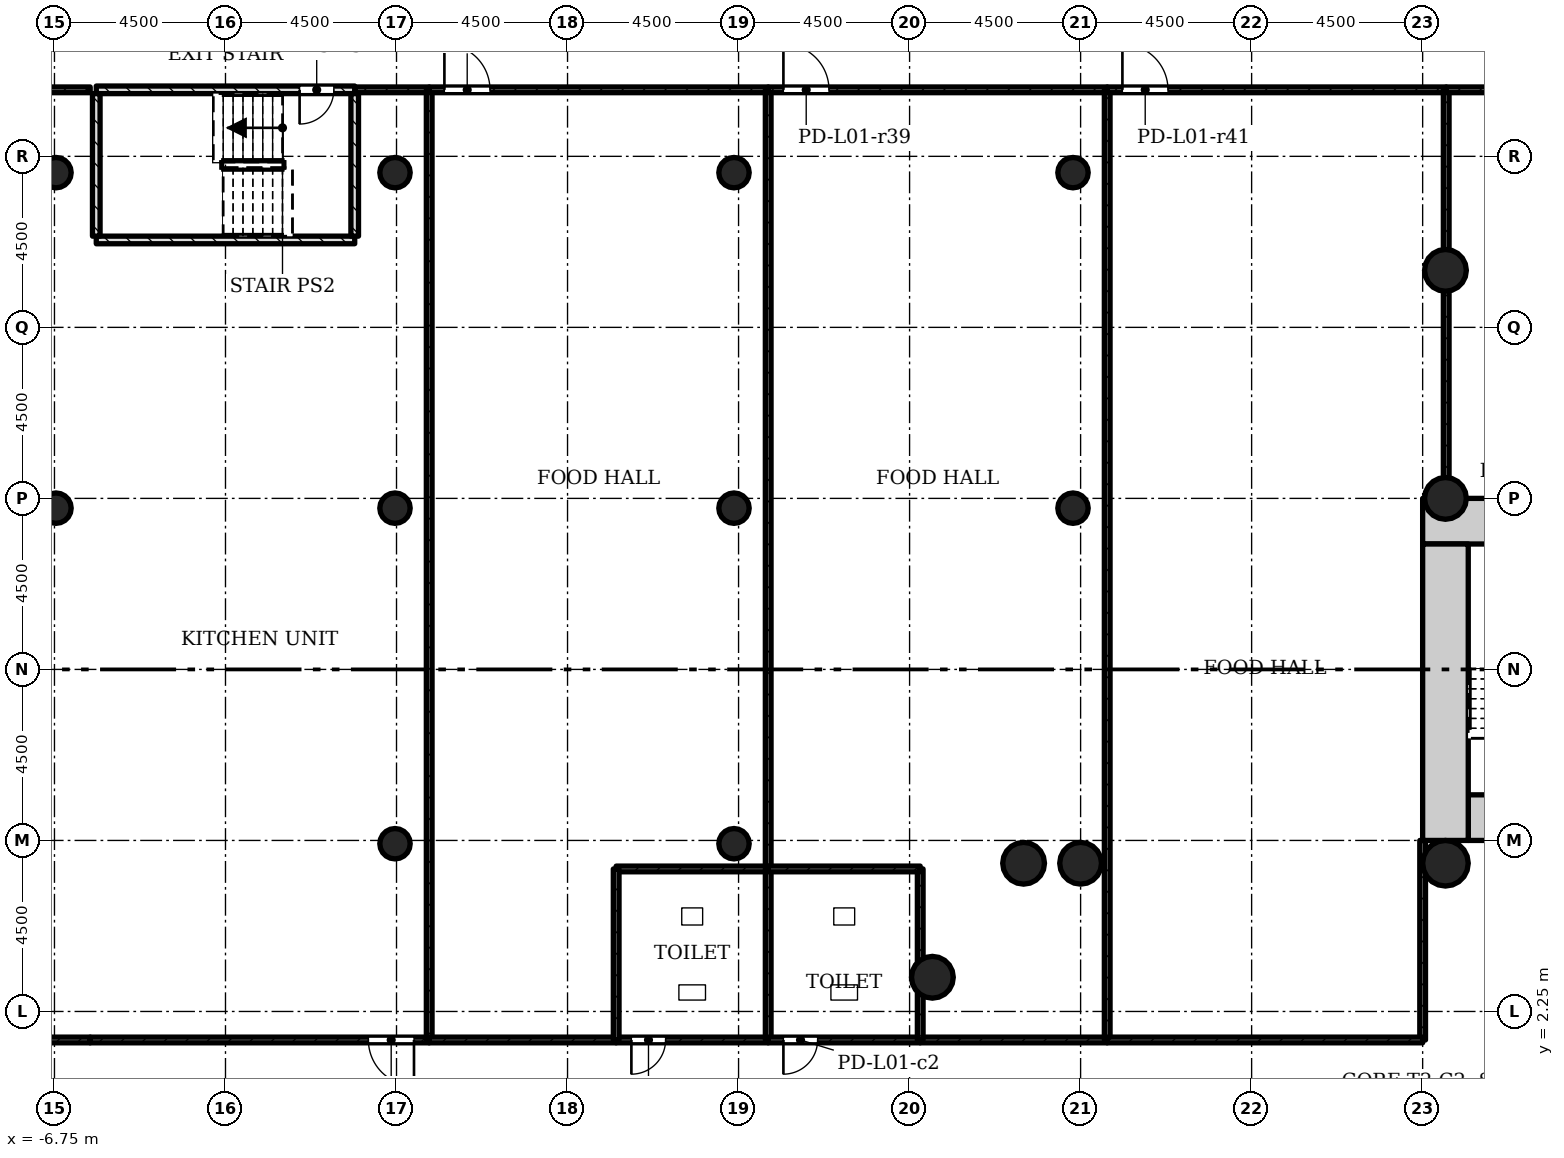
"""IFC4 building model, lengths in metres.
Left out: names, types, materials, properties, quantities, classifications, styles, units other than length and angle.
Written with IfcOpenShell. Run it as: python <this file> out.ifc"""

import sys

from ifc_helpers import new_model, si_unit, direction, frame, frame_2d, origin, origin_2d, place, context, subcontext, project, spatial, rectangle, hollow_circle, extrude, element, fill, save


model = new_model("IFC4")
c1 = context("Model", 3, precision=1e-05, world=origin(), true_north=direction((0.0, 1.0)))
c2 = subcontext(c1, "Body", "Model", "MODEL_VIEW")
j1 = project(units=[si_unit("LENGTHUNIT", "METRE"), si_unit("PLANEANGLEUNIT", "RADIAN")], contexts=[c1])
p1 = place(None, origin())
s1 = spatial("IfcSite", under=j1, at=p1, CompositionType="ELEMENT")
p2 = place(p1, origin())
s2 = spatial("IfcBuilding", under=s1, at=p2, CompositionType="ELEMENT")
p3 = place(p2, frame((0.0, 0.0, 6.0)))
s3 = spatial("IfcBuildingStorey", under=s2, at=p3, CompositionType="ELEMENT", Elevation=6.0)
p4 = place(p3, frame((30.45, 7.35, 0.0), z_axis=(0.0, 0.0, 1.0), x_axis=(1.0, 0.0, 0.0)))
e1 = element("IfcWall", 1, at=p4, inside=s3, PredefinedType="SHEAR", context=c2, shape_type="SweptSolid", body=[
    extrude(rectangle(XDim=12.3, YDim=1.2, at=frame_2d((6.15, 0.0))), origin(), (0.0, 0.0, 1.0), 5.0),
])
p5 = place(p4, frame((4.65, 0.0, 0.0)))
e2 = element("IfcOpeningElement", 2, at=p5, cuts=e1, PredefinedType="OPENING", context=c2, shape_type="SweptSolid", body=[
    extrude(rectangle(XDim=1.8, YDim=2.1, at=frame_2d((0.9, 1.05))), frame((0.0, 0.61, 0.0), z_axis=(0.0, -1.0, 0.0), x_axis=(1.0, 0.0, 0.0)), (0.0, 0.0, 1.0), 1.22),
])
p6 = place(p3, frame((41.55, 15.15, 0.0), z_axis=(0.0, 0.0, 1.0), x_axis=(-1.0, 0.0, 0.0)))
e3 = element("IfcWall", 3, at=p6, inside=s3, PredefinedType="SHEAR", context=c2, shape_type="SweptSolid", body=[
    extrude(rectangle(XDim=12.3, YDim=1.2, at=frame_2d((6.15, 0.0))), origin(), (0.0, 0.0, 1.0), 5.0),
])
p7 = place(p6, frame((4.65, 0.0, 0.0)))
e4 = element("IfcOpeningElement", 4, at=p7, cuts=e3, PredefinedType="OPENING", context=c2, shape_type="SweptSolid", body=[
    extrude(rectangle(XDim=1.8, YDim=2.1, at=frame_2d((0.9, 1.05))), frame((0.0, 0.61, 0.0), z_axis=(0.0, -1.0, 0.0), x_axis=(1.0, 0.0, 0.0)), (0.0, 0.0, 1.0), 1.22),
])
p8 = place(p3, frame((29.85, 14.55, 0.0), z_axis=(0.0, 0.0, 1.0), x_axis=(0.0, -1.0, 0.0)))
e5 = element("IfcWall", 5, at=p8, inside=s3, PredefinedType="SHEAR", context=c2, shape_type="SweptSolid", body=[
    extrude(rectangle(XDim=7.8, YDim=1.2, at=frame_2d((3.9, 0.0))), origin(), (0.0, 0.0, 1.0), 5.0),
])
for number, where, z_axis, x_axis in (
    (6, (29.85, 15.75, 0.0), (0.0, 0.0, 1.0), (1.0, 0.0, 0.0)),
    (7, (29.85, 21.75, 0.0), (0.0, 0.0, 1.0), (1.0, 0.0, 0.0)),
    (8, (20.25, 6.15, 0.0), (0.0, 0.0, 1.0), (1.0, 0.0, 0.0)),
    (9, (18.75, 6.15, 0.0), (0.0, 0.0, 1.0), (1.0, 0.0, 0.0)),
    (10, (16.35, 3.15, 0.0), (0.0, 0.0, 1.0), (1.0, 0.0, 0.0)),
):
    element("IfcColumn", number, at=place(p3, frame(where, z_axis=z_axis, x_axis=x_axis)), inside=s3, PredefinedType="COLUMN", context=c2, shape_type="SweptSolid", body=[
        extrude(hollow_circle(Radius=0.55, WallThickness=0.04, at=origin_2d()), origin(), (0.0, 0.0, 1.0), 5.0),
    ])
p9 = place(p3, frame((29.85, 6.15, 0.0), z_axis=(0.0, 0.0, 1.0), x_axis=(1.0, 0.0, 0.0)))
e11 = element("IfcColumn", 11, at=p9, inside=s3, PredefinedType="COLUMN", context=c2, shape_type="SweptSolid", body=[
    extrude(hollow_circle(Radius=0.6, WallThickness=0.045, at=origin_2d()), origin(), (0.0, 0.0, 1.0), 5.0),
])
for number, where, z_axis, x_axis in (
    (12, (2.21, 6.664, 0.0), (0.0, 0.0, 1.0), (1.0, 0.0, 0.0)),
    (13, (11.13, 6.664, 0.0), (0.0, 0.0, 1.0), (1.0, 0.0, 0.0)),
    (14, (-6.71, 15.493, 0.0), (0.0, 0.0, 1.0), (1.0, 0.0, 0.0)),
    (15, (2.21, 15.493, 0.0), (0.0, 0.0, 1.0), (1.0, 0.0, 0.0)),
    (16, (11.13, 15.493, 0.0), (0.0, 0.0, 1.0), (1.0, 0.0, 0.0)),
    (17, (20.05, 15.493, 0.0), (0.0, 0.0, 1.0), (1.0, 0.0, 0.0)),
    (18, (-6.71, 24.321, 0.0), (0.0, 0.0, 1.0), (1.0, 0.0, 0.0)),
    (19, (2.21, 24.321, 0.0), (0.0, 0.0, 1.0), (1.0, 0.0, 0.0)),
    (20, (11.13, 24.321, 0.0), (0.0, 0.0, 1.0), (1.0, 0.0, 0.0)),
    (21, (20.05, 24.321, 0.0), (0.0, 0.0, 1.0), (1.0, 0.0, 0.0)),
):
    element("IfcColumn", number, at=place(p3, frame(where, z_axis=z_axis, x_axis=x_axis)), inside=s3, PredefinedType="COLUMN", context=c2, shape_type="SweptSolid", body=[
        extrude(hollow_circle(Radius=0.4, WallThickness=0.028, at=origin_2d()), origin(), (0.0, 0.0, 1.0), 5.0),
    ])
p10 = place(p3, frame((-14.73, 26.5, 0.0), z_axis=(0.0, 0.0, 1.0), x_axis=(1.0, 0.0, 0.0)))
e22 = element("IfcWall", 22, at=p10, inside=s3, PredefinedType="PARTITIONING", context=c2, shape_type="SweptSolid", body=[
    extrude(rectangle(XDim=8.92, YDim=0.15, at=frame_2d((4.46, 0.0))), origin(), (0.0, 0.0, 1.0), 4.58),
])
p11 = place(p10, frame((0.4, 0.0, 0.0)))
e23 = element("IfcOpeningElement", 23, at=p11, cuts=e22, PredefinedType="OPENING", context=c2, shape_type="SweptSolid", body=[
    extrude(rectangle(XDim=1.2, YDim=2.1, at=frame_2d((0.6, 1.05))), frame((0.0, 0.085, 0.0), z_axis=(0.0, -1.0, 0.0), x_axis=(1.0, 0.0, 0.0)), (0.0, 0.0, 1.0), 0.17),
])
p12 = place(p3, frame((-5.81, 1.5, 0.0), z_axis=(0.0, 0.0, 1.0), x_axis=(-1.0, 0.0, 0.0)))
e24 = element("IfcWall", 24, at=p12, inside=s3, PredefinedType="PARTITIONING", context=c2, shape_type="SweptSolid", body=[
    extrude(rectangle(XDim=8.92, YDim=0.15, at=frame_2d((4.46, 0.0))), origin(), (0.0, 0.0, 1.0), 4.58),
])
p13 = place(p3, frame((-5.65, 26.5, 0.0), z_axis=(0.0, 0.0, 1.0), x_axis=(1.0, 0.0, 0.0)))
e25 = element("IfcWall", 25, at=p13, inside=s3, PredefinedType="SHEAR", context=c2, shape_type="SweptSolid", body=[
    extrude(rectangle(XDim=6.8, YDim=0.2, at=frame_2d((3.4, 0.0))), origin(), (0.0, 0.0, 1.0), 4.58),
])
p14 = place(p13, frame((5.35, 0.0, 0.0)))
e26 = element("IfcOpeningElement", 26, at=p14, cuts=e25, PredefinedType="OPENING", context=c2, shape_type="SweptSolid", body=[
    extrude(rectangle(XDim=0.9, YDim=2.1, at=frame_2d((0.45, 1.05))), frame((0.0, 0.11, 0.0), z_axis=(0.0, -1.0, 0.0), x_axis=(1.0, 0.0, 0.0)), (0.0, 0.0, 1.0), 0.22),
])
p15 = place(p3, frame((-5.65, 22.55, 0.0), z_axis=(0.0, 0.0, 1.0), x_axis=(1.0, 0.0, 0.0)))
e27 = element("IfcWall", 27, at=p15, inside=s3, PredefinedType="SHEAR", context=c2, shape_type="SweptSolid", body=[
    extrude(rectangle(XDim=6.8, YDim=0.2, at=frame_2d((3.4, 0.0))), origin(), (0.0, 0.0, 1.0), 4.58),
])
for number, where, z_axis, x_axis in (
    (28, (-5.65, 22.65, 0.0), (0.0, 0.0, 1.0), (0.0, 1.0, 0.0)),
    (29, (1.15, 22.65, 0.0), (0.0, 0.0, 1.0), (0.0, 1.0, 0.0)),
):
    element("IfcWall", number, at=place(p3, frame(where, z_axis=z_axis, x_axis=x_axis)), inside=s3, PredefinedType="SHEAR", context=c2, shape_type="SweptSolid", body=[
        extrude(rectangle(XDim=3.75, YDim=0.2, at=frame_2d((1.875, 0.0))), origin(), (0.0, 0.0, 1.0), 4.58),
    ])
p16 = place(p3, frame((1.15, 26.5, 0.0), z_axis=(0.0, 0.0, 1.0), x_axis=(1.0, 0.0, 0.0)))
e30 = element("IfcWall", 30, at=p16, inside=s3, PredefinedType="PARTITIONING", context=c2, shape_type="SweptSolid", body=[
    extrude(rectangle(XDim=1.96, YDim=0.15, at=frame_2d((0.98, 0.0))), origin(), (0.0, 0.0, 1.0), 4.58),
])
p17 = place(p3, frame((3.11, 1.5, 0.0), z_axis=(0.0, 0.0, 1.0), x_axis=(-1.0, 0.0, 0.0)))
e31 = element("IfcWall", 31, at=p17, inside=s3, PredefinedType="PARTITIONING", context=c2, shape_type="SweptSolid", body=[
    extrude(rectangle(XDim=8.92, YDim=0.15, at=frame_2d((4.46, 0.0))), origin(), (0.0, 0.0, 1.0), 4.58),
])
p18 = place(p17, frame((0.4, 0.0, 0.0)))
e32 = element("IfcOpeningElement", 32, at=p18, cuts=e31, PredefinedType="OPENING", context=c2, shape_type="SweptSolid", body=[
    extrude(rectangle(XDim=1.2, YDim=2.1, at=frame_2d((0.6, 1.05))), frame((0.0, 0.085, 0.0), z_axis=(0.0, -1.0, 0.0), x_axis=(1.0, 0.0, 0.0)), (0.0, 0.0, 1.0), 0.17),
])
p19 = place(p3, frame((3.11, 26.5, 0.0), z_axis=(0.0, 0.0, 1.0), x_axis=(0.0, -1.0, 0.0)))
e33 = element("IfcWall", 33, at=p19, inside=s3, PredefinedType="PARTITIONING", context=c2, shape_type="SweptSolid", body=[
    extrude(rectangle(XDim=25.0, YDim=0.15, at=frame_2d((12.5, 0.0))), origin(), (0.0, 0.0, 1.0), 4.58),
])
p20 = place(p3, frame((8.03, 1.5, 0.0), z_axis=(0.0, 0.0, 1.0), x_axis=(-1.0, 0.0, 0.0)))
e34 = element("IfcWall", 34, at=p20, inside=s3, PredefinedType="PARTITIONING", context=c2, shape_type="SweptSolid", body=[
    extrude(rectangle(XDim=4.92, YDim=0.15, at=frame_2d((2.46, 0.0))), origin(), (0.0, 0.0, 1.0), 4.58),
])
p21 = place(p3, frame((3.11, 26.5, 0.0), z_axis=(0.0, 0.0, 1.0), x_axis=(1.0, 0.0, 0.0)))
e35 = element("IfcWall", 35, at=p21, inside=s3, PredefinedType="PARTITIONING", context=c2, shape_type="SweptSolid", body=[
    extrude(rectangle(XDim=8.92, YDim=0.15, at=frame_2d((4.46, 0.0))), origin(), (0.0, 0.0, 1.0), 4.58),
])
p22 = place(p21, frame((0.4, 0.0, 0.0)))
e36 = element("IfcOpeningElement", 36, at=p22, cuts=e35, PredefinedType="OPENING", context=c2, shape_type="SweptSolid", body=[
    extrude(rectangle(XDim=1.2, YDim=2.1, at=frame_2d((0.6, 1.05))), frame((0.0, 0.085, 0.0), z_axis=(0.0, -1.0, 0.0), x_axis=(1.0, 0.0, 0.0)), (0.0, 0.0, 1.0), 0.17),
])
p23 = place(p3, frame((12.03, 26.5, 0.0), z_axis=(0.0, 0.0, 1.0), x_axis=(0.0, -1.0, 0.0)))
e37 = element("IfcWall", 37, at=p23, inside=s3, PredefinedType="PARTITIONING", context=c2, shape_type="SweptSolid", body=[
    extrude(rectangle(XDim=20.5, YDim=0.15, at=frame_2d((10.25, 0.0))), origin(), (0.0, 0.0, 1.0), 4.58),
])
p24 = place(p3, frame((12.03, 26.5, 0.0), z_axis=(0.0, 0.0, 1.0), x_axis=(1.0, 0.0, 0.0)))
e38 = element("IfcWall", 38, at=p24, inside=s3, PredefinedType="PARTITIONING", context=c2, shape_type="SweptSolid", body=[
    extrude(rectangle(XDim=8.92, YDim=0.15, at=frame_2d((4.46, 0.0))), origin(), (0.0, 0.0, 1.0), 4.58),
])
p25 = place(p24, frame((0.4, 0.0, 0.0)))
e39 = element("IfcOpeningElement", 39, at=p25, cuts=e38, PredefinedType="OPENING", context=c2, shape_type="SweptSolid", body=[
    extrude(rectangle(XDim=1.2, YDim=2.1, at=frame_2d((0.6, 1.05))), frame((0.0, 0.085, 0.0), z_axis=(0.0, -1.0, 0.0), x_axis=(1.0, 0.0, 0.0)), (0.0, 0.0, 1.0), 0.17),
])
p26 = place(p3, frame((20.95, 1.5, 0.0), z_axis=(0.0, 0.0, 1.0), x_axis=(-1.0, 0.0, 0.0)))
e40 = element("IfcWall", 40, at=p26, inside=s3, PredefinedType="PARTITIONING", context=c2, shape_type="SweptSolid", body=[
    extrude(rectangle(XDim=4.92, YDim=0.15, at=frame_2d((2.46, 0.0))), origin(), (0.0, 0.0, 1.0), 4.58),
])
p27 = place(p3, frame((20.95, 26.5, 0.0), z_axis=(0.0, 0.0, 1.0), x_axis=(0.0, -1.0, 0.0)))
e41 = element("IfcWall", 41, at=p27, inside=s3, PredefinedType="PARTITIONING", context=c2, shape_type="SweptSolid", body=[
    extrude(rectangle(XDim=25.0, YDim=0.15, at=frame_2d((12.5, 0.0))), origin(), (0.0, 0.0, 1.0), 4.58),
])
p28 = place(p3, frame((20.95, 26.5, 0.0), z_axis=(0.0, 0.0, 1.0), x_axis=(1.0, 0.0, 0.0)))
e42 = element("IfcWall", 42, at=p28, inside=s3, PredefinedType="PARTITIONING", context=c2, shape_type="SweptSolid", body=[
    extrude(rectangle(XDim=8.92, YDim=0.15, at=frame_2d((4.46, 0.0))), origin(), (0.0, 0.0, 1.0), 4.58),
])
p29 = place(p28, frame((0.4, 0.0, 0.0)))
e43 = element("IfcOpeningElement", 43, at=p29, cuts=e42, PredefinedType="OPENING", context=c2, shape_type="SweptSolid", body=[
    extrude(rectangle(XDim=1.2, YDim=2.1, at=frame_2d((0.6, 1.05))), frame((0.0, 0.085, 0.0), z_axis=(0.0, -1.0, 0.0), x_axis=(1.0, 0.0, 0.0)), (0.0, 0.0, 1.0), 0.17),
])
p30 = place(p3, frame((29.25, 6.75, 0.0), z_axis=(0.0, 0.0, 1.0), x_axis=(0.0, -1.0, 0.0)))
e44 = element("IfcWall", 44, at=p30, inside=s3, PredefinedType="PARTITIONING", context=c2, shape_type="SweptSolid", body=[
    extrude(rectangle(XDim=5.25, YDim=0.15, at=frame_2d((2.625, 0.0))), origin(), (0.0, 0.0, 1.0), 4.58),
])
p31 = place(p3, frame((29.25, 1.5, 0.0), z_axis=(0.0, 0.0, 1.0), x_axis=(-1.0, 0.0, 0.0)))
e45 = element("IfcWall", 45, at=p31, inside=s3, PredefinedType="PARTITIONING", context=c2, shape_type="SweptSolid", body=[
    extrude(rectangle(XDim=8.3, YDim=0.15, at=frame_2d((4.15, 0.0))), origin(), (0.0, 0.0, 1.0), 4.58),
])
p32 = place(p3, frame((29.87, 26.5, 0.0), z_axis=(0.0, 0.0, 1.0), x_axis=(0.0, -1.0, 0.0)))
e46 = element("IfcWall", 46, at=p32, inside=s3, PredefinedType="PARTITIONING", context=c2, shape_type="SweptSolid", body=[
    extrude(rectangle(XDim=10.75, YDim=0.15, at=frame_2d((5.375, 0.0))), origin(), (0.0, 0.0, 1.0), 4.58),
])
p33 = place(p3, frame((29.87, 26.5, 0.0), z_axis=(0.0, 0.0, 1.0), x_axis=(1.0, 0.0, 0.0)))
e47 = element("IfcWall", 47, at=p33, inside=s3, PredefinedType="PARTITIONING", context=c2, shape_type="SweptSolid", body=[
    extrude(rectangle(XDim=4.63, YDim=0.15, at=frame_2d((2.315, 0.0))), origin(), (0.0, 0.0, 1.0), 4.58),
])
p34 = place(p3, frame((8.03, 1.5, 0.0), z_axis=(0.0, 0.0, 1.0), x_axis=(1.0, 0.0, 0.0)))
e48 = element("IfcWall", 48, at=p34, inside=s3, PredefinedType="PARTITIONING", context=c2, shape_type="SweptSolid", body=[
    extrude(rectangle(XDim=4.0, YDim=0.15, at=frame_2d((2.0, 0.0))), origin(), (0.0, 0.0, 1.0), 4.58),
])
p35 = place(p34, frame((0.4, 0.0, 0.0)))
e49 = element("IfcOpeningElement", 49, at=p35, cuts=e48, PredefinedType="OPENING", context=c2, shape_type="SweptSolid", body=[
    extrude(rectangle(XDim=0.9, YDim=2.1, at=frame_2d((0.45, 1.05))), frame((0.0, 0.085, 0.0), z_axis=(0.0, -1.0, 0.0), x_axis=(1.0, 0.0, 0.0)), (0.0, 0.0, 1.0), 0.17),
])
p36 = place(p3, frame((12.03, 6.0, 0.0), z_axis=(0.0, 0.0, 1.0), x_axis=(-1.0, 0.0, 0.0)))
e50 = element("IfcWall", 50, at=p36, inside=s3, PredefinedType="PARTITIONING", context=c2, shape_type="SweptSolid", body=[
    extrude(rectangle(XDim=4.0, YDim=0.15, at=frame_2d((2.0, 0.0))), origin(), (0.0, 0.0, 1.0), 4.58),
])
for number, where, z_axis, x_axis in (
    (51, (8.03, 6.0, 0.0), (0.0, 0.0, 1.0), (0.0, -1.0, 0.0)),
    (52, (12.03, 1.5, 0.0), (0.0, 0.0, 1.0), (0.0, 1.0, 0.0)),
):
    element("IfcWall", number, at=place(p3, frame(where, z_axis=z_axis, x_axis=x_axis)), inside=s3, PredefinedType="PARTITIONING", context=c2, shape_type="SweptSolid", body=[
        extrude(rectangle(XDim=4.5, YDim=0.15, at=frame_2d((2.25, 0.0))), origin(), (0.0, 0.0, 1.0), 4.58),
    ])
p37 = place(p3, frame((12.03, 1.5, 0.0), z_axis=(0.0, 0.0, 1.0), x_axis=(1.0, 0.0, 0.0)))
e53 = element("IfcWall", 53, at=p37, inside=s3, PredefinedType="PARTITIONING", context=c2, shape_type="SweptSolid", body=[
    extrude(rectangle(XDim=4.0, YDim=0.15, at=frame_2d((2.0, 0.0))), origin(), (0.0, 0.0, 1.0), 4.58),
])
p38 = place(p37, frame((0.4, 0.0, 0.0)))
e54 = element("IfcOpeningElement", 54, at=p38, cuts=e53, PredefinedType="OPENING", context=c2, shape_type="SweptSolid", body=[
    extrude(rectangle(XDim=0.9, YDim=2.1, at=frame_2d((0.45, 1.05))), frame((0.0, 0.085, 0.0), z_axis=(0.0, -1.0, 0.0), x_axis=(1.0, 0.0, 0.0)), (0.0, 0.0, 1.0), 0.17),
])
p39 = place(p3, frame((16.03, 1.5, 0.0), z_axis=(0.0, 0.0, 1.0), x_axis=(0.0, 1.0, 0.0)))
e55 = element("IfcWall", 55, at=p39, inside=s3, PredefinedType="PARTITIONING", context=c2, shape_type="SweptSolid", body=[
    extrude(rectangle(XDim=4.5, YDim=0.15, at=frame_2d((2.25, 0.0))), origin(), (0.0, 0.0, 1.0), 4.58),
])
p40 = place(p3, frame((16.03, 6.0, 0.0), z_axis=(0.0, 0.0, 1.0), x_axis=(-1.0, 0.0, 0.0)))
e56 = element("IfcWall", 56, at=p40, inside=s3, PredefinedType="PARTITIONING", context=c2, shape_type="SweptSolid", body=[
    extrude(rectangle(XDim=4.0, YDim=0.15, at=frame_2d((2.0, 0.0))), origin(), (0.0, 0.0, 1.0), 4.58),
])
p41 = place(p14, origin())
e57 = element("IfcDoor", 57, at=p41, inside=s3, OperationType="SINGLE_SWING_LEFT", PredefinedType="DOOR", context=c2, shape_type="SweptSolid", body=[
    extrude(rectangle(XDim=0.9, YDim=2.1, at=frame_2d((0.45, 1.05))), frame((0.0, 0.025, 0.0), z_axis=(0.0, -1.0, 0.0), x_axis=(1.0, 0.0, 0.0)), (0.0, 0.0, 1.0), 0.05),
])
fill(e26, e57)
p42 = place(p18, origin())
e58 = element("IfcDoor", 58, at=p42, inside=s3, OperationType="SINGLE_SWING_RIGHT", PredefinedType="DOOR", context=c2, shape_type="SweptSolid", body=[
    extrude(rectangle(XDim=1.2, YDim=2.1, at=frame_2d((0.6, 1.05))), frame((0.0, 0.025, 0.0), z_axis=(0.0, -1.0, 0.0), x_axis=(1.0, 0.0, 0.0)), (0.0, 0.0, 1.0), 0.05),
])
fill(e32, e58)
p43 = place(p22, origin())
e59 = element("IfcDoor", 59, at=p43, inside=s3, OperationType="SINGLE_SWING_RIGHT", PredefinedType="DOOR", context=c2, shape_type="SweptSolid", body=[
    extrude(rectangle(XDim=1.2, YDim=2.1, at=frame_2d((0.6, 1.05))), frame((0.0, 0.025, 0.0), z_axis=(0.0, -1.0, 0.0), x_axis=(1.0, 0.0, 0.0)), (0.0, 0.0, 1.0), 0.05),
])
fill(e36, e59)
p44 = place(p25, origin())
e60 = element("IfcDoor", 60, at=p44, inside=s3, OperationType="SINGLE_SWING_RIGHT", PredefinedType="DOOR", context=c2, shape_type="SweptSolid", body=[
    extrude(rectangle(XDim=1.2, YDim=2.1, at=frame_2d((0.6, 1.05))), frame((0.0, 0.025, 0.0), z_axis=(0.0, -1.0, 0.0), x_axis=(1.0, 0.0, 0.0)), (0.0, 0.0, 1.0), 0.05),
])
fill(e39, e60)
p45 = place(p29, origin())
e61 = element("IfcDoor", 61, at=p45, inside=s3, OperationType="SINGLE_SWING_RIGHT", PredefinedType="DOOR", context=c2, shape_type="SweptSolid", body=[
    extrude(rectangle(XDim=1.2, YDim=2.1, at=frame_2d((0.6, 1.05))), frame((0.0, 0.025, 0.0), z_axis=(0.0, -1.0, 0.0), x_axis=(1.0, 0.0, 0.0)), (0.0, 0.0, 1.0), 0.05),
])
fill(e43, e61)
p46 = place(p35, origin())
e62 = element("IfcDoor", 62, at=p46, inside=s3, OperationType="SINGLE_SWING_LEFT", PredefinedType="DOOR", context=c2, shape_type="SweptSolid", body=[
    extrude(rectangle(XDim=0.9, YDim=2.1, at=frame_2d((0.45, 1.05))), frame((0.0, 0.025, 0.0), z_axis=(0.0, -1.0, 0.0), x_axis=(1.0, 0.0, 0.0)), (0.0, 0.0, 1.0), 0.05),
])
fill(e49, e62)
p47 = place(p38, origin())
e63 = element("IfcDoor", 63, at=p47, inside=s3, OperationType="SINGLE_SWING_LEFT", PredefinedType="DOOR", context=c2, shape_type="SweptSolid", body=[
    extrude(rectangle(XDim=0.9, YDim=2.1, at=frame_2d((0.45, 1.05))), frame((0.0, 0.025, 0.0), z_axis=(0.0, -1.0, 0.0), x_axis=(1.0, 0.0, 0.0)), (0.0, 0.0, 1.0), 0.05),
])
fill(e54, e63)
save(model, sys.argv[1])
